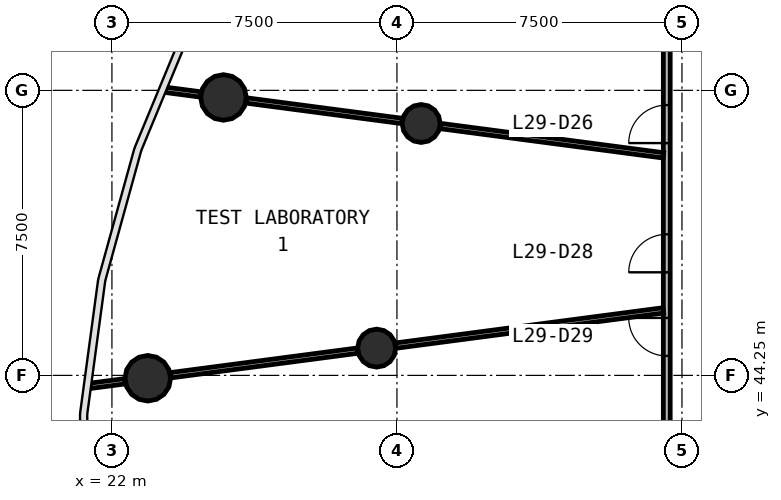
"""IFC4 building model, lengths in metres.
Left out: names, types, materials, properties, quantities, classifications, styles, units other than length and angle.
Written with IfcOpenShell. Run it as: python <this file> out.ifc"""

import sys

from ifc_helpers import new_model, si_unit, direction, frame, frame_2d, origin, origin_2d, place, context, subcontext, project, spatial, rectangle, circle, extrude, source, transform, mapped, element, fill, save


model = new_model("IFC4")
c1 = context("Model", 3, precision=1e-05, world=origin(), true_north=direction((0.0, 1.0)))
c2 = subcontext(c1, "Body", "Model", "MODEL_VIEW")
j1 = project(units=[si_unit("LENGTHUNIT", "METRE"), si_unit("PLANEANGLEUNIT", "RADIAN")], contexts=[c1])
p1 = place(None, origin())
s1 = spatial("IfcSite", under=j1, at=p1, CompositionType="ELEMENT")
p2 = place(p1, origin())
s2 = spatial("IfcBuilding", under=s1, at=p2, CompositionType="ELEMENT")
p3 = place(p2, frame((0.0, 0.0, 124.9)))
s3 = spatial("IfcBuildingStorey", under=s2, at=p3, CompositionType="ELEMENT", Elevation=124.9)
m1 = source(origin(), c2, "Body", "SweptSolid", [
    extrude(circle(Radius=0.6, at=origin_2d()), origin(), (0.0, 0.0, 1.0), 4.1),
])
for number, where, z_axis, x_axis in (
    (1, (24.936, 51.563, 0.0), (0.0, 0.0, 1.0), (1.0, 0.0, 0.0)),
    (2, (22.944, 44.175, 0.0), (0.0, 0.0, 1.0), (1.0, 0.0, 0.0)),
):
    element("IfcColumn", number, at=place(p3, frame(where, z_axis=z_axis, x_axis=x_axis)), inside=s3, PredefinedType="COLUMN", context=c2, shape_type="MappedRepresentation", body=[
        mapped(m1, transform((0.0, 0.0, 0.0), scale=1.0)),
    ])
m2 = source(origin(), c2, "Body", "SweptSolid", [
    extrude(circle(Radius=0.5, at=origin_2d()), origin(), (0.0, 0.0, 1.0), 4.1),
])
for number, where, z_axis, x_axis in (
    (3, (30.137, 50.878, 0.0), (0.0, 0.0, 1.0), (1.0, 0.0, 0.0)),
    (4, (28.966, 44.968, 0.0), (0.0, 0.0, 1.0), (1.0, 0.0, 0.0)),
):
    element("IfcColumn", number, at=place(p3, frame(where, z_axis=z_axis, x_axis=x_axis)), inside=s3, PredefinedType="COLUMN", context=c2, shape_type="MappedRepresentation", body=[
        mapped(m2, transform((0.0, 0.0, 0.0), scale=1.0)),
    ])
p4 = place(p3, frame((36.6, 35.63, 0.0), z_axis=(0.0, 0.0, 1.0), x_axis=(0.0, 1.0, 0.0)))
e5 = element("IfcWall", 5, at=p4, inside=s3, PredefinedType="PARTITIONING", context=c2, shape_type="SweptSolid", body=[
    extrude(rectangle(XDim=23.583, YDim=0.18, at=frame_2d((11.791, 0.0))), origin(), (0.0, 0.0, 1.0), 2.8),
])
p5 = place(p4, frame((14.732, 0.0, 0.0)))
e6 = element("IfcOpeningElement", 6, at=p5, cuts=e5, PredefinedType="OPENING", context=c2, shape_type="SweptSolid", body=[
    extrude(rectangle(XDim=1.0, YDim=2.1, at=frame_2d((0.5, 1.05))), frame((0.0, 0.1, 0.0), z_axis=(0.0, -1.0, 0.0), x_axis=(1.0, 0.0, 0.0)), (0.0, 0.0, 1.0), 0.2),
])
p6 = place(p4, frame((11.333, 0.0, 0.0)))
e7 = element("IfcOpeningElement", 7, at=p6, cuts=e5, PredefinedType="OPENING", context=c2, shape_type="SweptSolid", body=[
    extrude(rectangle(XDim=1.0, YDim=2.1, at=frame_2d((0.5, 1.05))), frame((0.0, 0.1, 0.0), z_axis=(0.0, -1.0, 0.0), x_axis=(1.0, 0.0, 0.0)), (0.0, 0.0, 1.0), 0.2),
])
p7 = place(p4, frame((9.133, 0.0, 0.0)))
e8 = element("IfcOpeningElement", 8, at=p7, cuts=e5, PredefinedType="OPENING", context=c2, shape_type="SweptSolid", body=[
    extrude(rectangle(XDim=1.0, YDim=2.1, at=frame_2d((0.5, 1.05))), frame((0.0, 0.1, 0.0), z_axis=(0.0, -1.0, 0.0), x_axis=(1.0, 0.0, 0.0)), (0.0, 0.0, 1.0), 0.2),
])
p8 = place(p3, frame((36.51, 45.961, 0.0), z_axis=(0.0, 0.0, 1.0), x_axis=(-0.99144622305, -0.130515848849, 0.0)))
e9 = element("IfcWall", 9, at=p8, inside=s3, PredefinedType="PARTITIONING", context=c2, shape_type="SweptSolid", body=[
    extrude(rectangle(XDim=7.104, YDim=0.14, at=frame_2d((3.552, 0.0))), origin(), (0.0, 0.0, 1.0), 2.8),
])
p9 = place(p3, frame((36.51, 50.039, 0.0), z_axis=(0.0, 0.0, 1.0), x_axis=(-0.991445034615, 0.130524876315, 0.0)))
e10 = element("IfcWall", 10, at=p9, inside=s3, PredefinedType="PARTITIONING", context=c2, shape_type="SweptSolid", body=[
    extrude(rectangle(XDim=5.924, YDim=0.14, at=frame_2d((2.962, 0.0))), origin(), (0.0, 0.0, 1.0), 2.8),
])
p10 = place(p3, frame((28.466, 44.902, 0.0), z_axis=(0.0, 0.0, 1.0), x_axis=(-0.991443414541, -0.130537181533, 0.0)))
e11 = element("IfcWall", 11, at=p10, inside=s3, PredefinedType="PARTITIONING", context=c2, shape_type="SweptSolid", body=[
    extrude(rectangle(XDim=4.966, YDim=0.14, at=frame_2d((2.483, 0.0))), origin(), (0.0, 0.0, 1.0), 2.8),
])
p11 = place(p3, frame((29.637, 50.944, 0.0), z_axis=(0.0, 0.0, 1.0), x_axis=(-0.991445054296, 0.130524726824, 0.0)))
e12 = element("IfcWall", 12, at=p11, inside=s3, PredefinedType="PARTITIONING", context=c2, shape_type="SweptSolid", body=[
    extrude(rectangle(XDim=4.137, YDim=0.14, at=frame_2d((2.069, 0.0))), origin(), (0.0, 0.0, 1.0), 2.8),
])
p12 = place(p3, frame((24.336, 51.642, 0.0), z_axis=(0.0, 0.0, 1.0), x_axis=(-0.991449038396, 0.130494460661, 0.0)))
e13 = element("IfcWall", 13, at=p12, inside=s3, PredefinedType="PARTITIONING", context=c2, shape_type="SweptSolid", body=[
    extrude(rectangle(XDim=0.948, YDim=0.14, at=frame_2d((0.474, 0.0))), origin(), (0.0, 0.0, 1.0), 2.8),
])
p13 = place(p3, frame((22.344, 44.096, 0.0), z_axis=(0.0, 0.0, 1.0), x_axis=(-0.991460558593, -0.130406904551, 0.0)))
e14 = element("IfcWall", 14, at=p13, inside=s3, PredefinedType="PARTITIONING", context=c2, shape_type="SweptSolid", body=[
    extrude(rectangle(XDim=0.928, YDim=0.14, at=frame_2d((0.464, 0.0))), origin(), (0.0, 0.0, 1.0), 2.8),
])
m3 = source(origin(), c2, "Body", "SweptSolid", [
    extrude(rectangle(XDim=1.0, YDim=2.1, at=frame_2d((0.5, 1.05))), frame((0.0, 0.025, 0.0), z_axis=(0.0, -1.0, 0.0), x_axis=(1.0, 0.0, 0.0)), (0.0, 0.0, 1.0), 0.05),
])
p14 = place(p5, origin())
e15 = element("IfcDoor", 15, at=p14, inside=s3, OperationType="SINGLE_SWING_LEFT", PredefinedType="DOOR", context=c2, shape_type="MappedRepresentation", body=[
    mapped(m3, transform((0.0, 0.0, 0.0), scale=1.0)),
])
fill(e6, e15)
p15 = place(p6, origin())
e16 = element("IfcDoor", 16, at=p15, inside=s3, OperationType="SINGLE_SWING_LEFT", PredefinedType="DOOR", context=c2, shape_type="MappedRepresentation", body=[
    mapped(m3, transform((0.0, 0.0, 0.0), scale=1.0)),
])
fill(e7, e16)
p16 = place(p7, origin())
e17 = element("IfcDoor", 17, at=p16, inside=s3, OperationType="SINGLE_SWING_RIGHT", PredefinedType="DOOR", context=c2, shape_type="MappedRepresentation", body=[
    mapped(m3, transform((0.0, 0.0, 0.0), scale=1.0)),
])
fill(e8, e17)
save(model, sys.argv[1])
